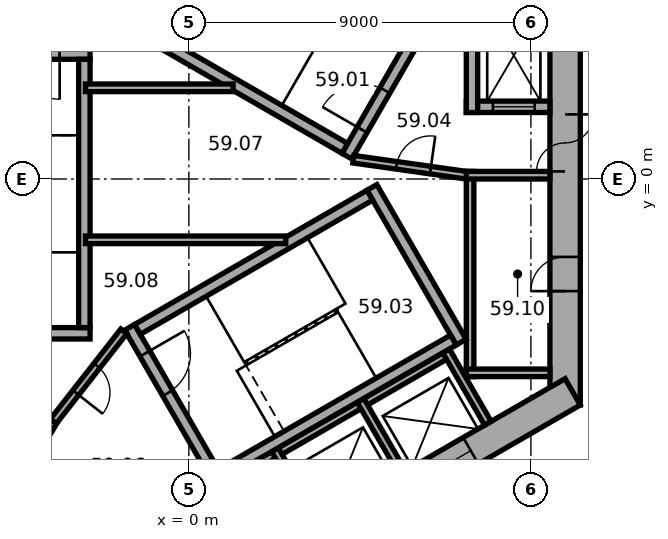
"""IFC4 building model, lengths in metres.
Left out: names, types, materials, properties, quantities, classifications, styles, units other than length and angle.
Written with IfcOpenShell. Run it as: python <this file> out.ifc"""

import sys

from ifc_helpers import new_model, si_unit, direction, frame, frame_2d, origin, place, context, subcontext, project, spatial, rectangle, extrude, element, fill, save


model = new_model("IFC4")
c1 = context("Model", 3, precision=1e-05, world=origin(), true_north=direction((0.0, 1.0)))
c2 = subcontext(c1, "Body", "Model", "MODEL_VIEW")
j1 = project(units=[si_unit("LENGTHUNIT", "METRE"), si_unit("PLANEANGLEUNIT", "RADIAN")], contexts=[c1])
p1 = place(None, origin())
s1 = spatial("IfcSite", under=j1, at=p1, CompositionType="ELEMENT")
p2 = place(p1, origin())
s2 = spatial("IfcBuilding", under=s1, at=p2, CompositionType="ELEMENT")
p3 = place(p2, frame((0.0, 0.0, 240.2)))
s3 = spatial("IfcBuildingStorey", under=s2, at=p3, CompositionType="ELEMENT", Elevation=240.2)
p4 = place(p3, frame((9.9, -5.947, 0.0), z_axis=(0.0, 0.0, 1.0), x_axis=(0.0, 1.0, 0.0)))
e1 = element("IfcWall", 1, at=p4, inside=s3, PredefinedType="SHEAR", context=c2, shape_type="SweptSolid", body=[
    extrude(rectangle(XDim=11.894, YDim=0.8, at=frame_2d((5.947, 0.0))), origin(), (0.0, 0.0, 1.0), 3.7),
])
p5 = place(p4, frame((6.147, 0.0, 0.0)))
e2 = element("IfcOpeningElement", 2, at=p5, cuts=e1, PredefinedType="OPENING", context=c2, shape_type="SweptSolid", body=[
    extrude(rectangle(XDim=1.5, YDim=2.1, at=frame_2d((0.75, 1.05))), frame((0.0, 0.41, 0.0), z_axis=(0.0, -1.0, 0.0), x_axis=(1.0, 0.0, 0.0)), (0.0, 0.0, 1.0), 0.82),
])
p6 = place(p4, frame((2.997, 0.0, 0.0)))
e3 = element("IfcOpeningElement", 3, at=p6, cuts=e1, PredefinedType="OPENING", context=c2, shape_type="SweptSolid", body=[
    extrude(rectangle(XDim=0.9, YDim=2.1, at=frame_2d((0.45, 1.05))), frame((0.0, 0.41, 0.0), z_axis=(0.0, -1.0, 0.0), x_axis=(1.0, 0.0, 0.0)), (0.0, 0.0, 1.0), 0.82),
])
p7 = place(p3, frame((-10.1, -5.6, 0.0), z_axis=(0.0, 0.0, 1.0), x_axis=(0.866023897231, -0.500002609418, 0.0)))
e4 = element("IfcWall", 4, at=p7, inside=s3, PredefinedType="SHEAR", context=c2, shape_type="SweptSolid", body=[
    extrude(rectangle(XDim=11.894, YDim=0.8, at=frame_2d((5.947, 0.0))), origin(), (0.0, 0.0, 1.0), 3.7),
])
p8 = place(p7, frame((6.147, 0.0, 0.0)))
e5 = element("IfcOpeningElement", 5, at=p8, cuts=e4, PredefinedType="OPENING", context=c2, shape_type="SweptSolid", body=[
    extrude(rectangle(XDim=1.5, YDim=2.1, at=frame_2d((0.75, 1.05))), frame((0.0, 0.41, 0.0), z_axis=(0.0, -1.0, 0.0), x_axis=(1.0, 0.0, 0.0)), (0.0, 0.0, 1.0), 0.82),
])
p9 = place(p7, frame((1.597, 0.0, 0.0)))
e6 = element("IfcOpeningElement", 6, at=p9, cuts=e4, PredefinedType="OPENING", context=c2, shape_type="SweptSolid", body=[
    extrude(rectangle(XDim=1.1, YDim=2.1, at=frame_2d((0.55, 1.05))), frame((0.0, 0.41, 0.0), z_axis=(0.0, -1.0, 0.0), x_axis=(1.0, 0.0, 0.0)), (0.0, 0.0, 1.0), 0.82),
])
p10 = place(p7, frame((4.197, 0.0, 0.0)))
e7 = element("IfcOpeningElement", 7, at=p10, cuts=e4, PredefinedType="OPENING", context=c2, shape_type="SweptSolid", body=[
    extrude(rectangle(XDim=1.1, YDim=2.1, at=frame_2d((0.55, 1.05))), frame((0.0, 0.41, 0.0), z_axis=(0.0, -1.0, 0.0), x_axis=(1.0, 0.0, 0.0)), (0.0, 0.0, 1.0), 0.82),
])
p11 = place(p3, frame((-0.2, -11.547, 0.0), z_axis=(0.0, 0.0, 1.0), x_axis=(0.866023897231, 0.500002609418, 0.0)))
e8 = element("IfcWall", 8, at=p11, inside=s3, PredefinedType="SHEAR", context=c2, shape_type="SweptSolid", body=[
    extrude(rectangle(XDim=11.894, YDim=0.8, at=frame_2d((5.947, 0.0))), origin(), (0.0, 0.0, 1.0), 3.7),
])
p12 = place(p11, frame((2.497, 0.0, 0.0)))
e9 = element("IfcOpeningElement", 9, at=p12, cuts=e8, PredefinedType="OPENING", context=c2, shape_type="SweptSolid", body=[
    extrude(rectangle(XDim=1.1, YDim=2.1, at=frame_2d((0.55, 1.05))), frame((0.0, 0.41, 0.0), z_axis=(0.0, -1.0, 0.0), x_axis=(1.0, 0.0, 0.0)), (0.0, 0.0, 1.0), 0.82),
])
p13 = place(p11, frame((5.097, 0.0, 0.0)))
e10 = element("IfcOpeningElement", 10, at=p13, cuts=e8, PredefinedType="OPENING", context=c2, shape_type="SweptSolid", body=[
    extrude(rectangle(XDim=1.1, YDim=2.1, at=frame_2d((0.55, 1.05))), frame((0.0, 0.41, 0.0), z_axis=(0.0, -1.0, 0.0), x_axis=(1.0, 0.0, 0.0)), (0.0, 0.0, 1.0), 0.82),
])
p14 = place(p11, frame((7.697, 0.0, 0.0)))
e11 = element("IfcOpeningElement", 11, at=p14, cuts=e8, PredefinedType="OPENING", context=c2, shape_type="SweptSolid", body=[
    extrude(rectangle(XDim=1.1, YDim=2.1, at=frame_2d((0.55, 1.05))), frame((0.0, 0.41, 0.0), z_axis=(0.0, -1.0, 0.0), x_axis=(1.0, 0.0, 0.0)), (0.0, 0.0, 1.0), 0.82),
])
p15 = place(p3, frame((7.4, -5.2, 0.0), z_axis=(0.0, 0.0, 1.0), x_axis=(0.0, 1.0, 0.0)))
e12 = element("IfcWall", 12, at=p15, inside=s3, PredefinedType="PARTITIONING", context=c2, shape_type="SweptSolid", body=[
    extrude(rectangle(XDim=5.4, YDim=0.2, at=frame_2d((2.7, 0.0))), origin(), (0.0, 0.0, 1.0), 3.42),
])
for number, where, z_axis, x_axis in (
    (13, (7.3, -5.1, 0.0), (0.0, 0.0, 1.0), (1.0, 0.0, 0.0)),
    (14, (7.3, 0.1, 0.0), (0.0, 0.0, 1.0), (1.0, 0.0, 0.0)),
):
    element("IfcWall", number, at=place(p3, frame(where, z_axis=z_axis, x_axis=x_axis)), inside=s3, PredefinedType="PARTITIONING", context=c2, shape_type="SweptSolid", body=[
        extrude(rectangle(XDim=2.2, YDim=0.2, at=frame_2d((1.1, 0.0))), origin(), (0.0, 0.0, 1.0), 3.42),
    ])
p16 = place(p3, frame((-8.203, -3.809, 0.0), z_axis=(0.0, 0.0, 1.0), x_axis=(0.866028230842, -0.499995103361, 0.0)))
e15 = element("IfcWall", 15, at=p16, inside=s3, PredefinedType="PARTITIONING", context=c2, shape_type="SweptSolid", body=[
    extrude(rectangle(XDim=5.4, YDim=0.2, at=frame_2d((2.7, 0.0))), origin(), (0.0, 0.0, 1.0), 3.42),
])
p17 = place(p3, frame((-3.563, -6.372, 0.0), z_axis=(0.0, 0.0, 1.0), x_axis=(-0.499994660107, -0.866028486751, 0.0)))
e16 = element("IfcWall", 16, at=p17, inside=s3, PredefinedType="PARTITIONING", context=c2, shape_type="SweptSolid", body=[
    extrude(rectangle(XDim=2.2, YDim=0.2, at=frame_2d((1.1, 0.0))), origin(), (0.0, 0.0, 1.0), 3.42),
])
p18 = place(p3, frame((-0.024, -8.559, 0.0), z_axis=(0.0, 0.0, 1.0), x_axis=(0.866026010844, 0.49999894854, 0.0)))
e17 = element("IfcWall", 17, at=p18, inside=s3, PredefinedType="PARTITIONING", context=c2, shape_type="SweptSolid", body=[
    extrude(rectangle(XDim=8.0, YDim=0.2, at=frame_2d((4.0, 0.0))), origin(), (0.0, 0.0, 1.0), 3.42),
])
for number, where, z_axis, x_axis in (
    (18, (2.264, -7.122, 0.0), (0.0, 0.0, 1.0), (0.5, -0.866, 0.0)),
    (19, (4.516, -5.822, 0.0), (0.0, 0.0, 1.0), (0.5, -0.866, 0.0)),
    (20, (6.768, -4.522, 0.0), (0.0, 0.0, 1.0), (0.5, -0.866, 0.0)),
):
    element("IfcWall", number, at=place(p3, frame(where, z_axis=z_axis, x_axis=x_axis)), inside=s3, PredefinedType="PARTITIONING", context=c2, shape_type="SweptSolid", body=[
        extrude(rectangle(XDim=2.2, YDim=0.2, at=frame_2d((1.1, 0.0))), origin(), (0.0, 0.0, 1.0), 3.42),
    ])
p19 = place(p3, frame((4.158, 0.602, 0.0), z_axis=(0.0, 0.0, 1.0), x_axis=(0.499977259774, 0.866038532462, 0.0)))
e21 = element("IfcWall", 21, at=p19, inside=s3, PredefinedType="SHEAR", context=c2, shape_type="SweptSolid", body=[
    extrude(rectangle(XDim=4.7, YDim=0.3, at=frame_2d((2.35, 0.0))), origin(), (0.0, 0.0, 1.0), 3.42),
])
p20 = place(p19, frame((0.8, 0.0, 0.0)))
e22 = element("IfcOpeningElement", 22, at=p20, cuts=e21, PredefinedType="OPENING", context=c2, shape_type="SweptSolid", body=[
    extrude(rectangle(XDim=1.2, YDim=2.1, at=frame_2d((0.6, 1.05))), frame((0.0, 0.16, 0.0), z_axis=(0.0, -1.0, 0.0), x_axis=(1.0, 0.0, 0.0)), (0.0, 0.0, 1.0), 0.32),
])
p21 = place(p3, frame((4.103, 0.807, 0.0), z_axis=(0.0, 0.0, 1.0), x_axis=(-0.866027801685, 0.499995846692, 0.0)))
e23 = element("IfcWall", 23, at=p21, inside=s3, PredefinedType="SHEAR", context=c2, shape_type="SweptSolid", body=[
    extrude(rectangle(XDim=7.06, YDim=0.3, at=frame_2d((3.53, 0.0))), origin(), (0.0, 0.0, 1.0), 3.42),
])
p22 = place(p3, frame((-2.6, 3.3, 0.0), z_axis=(0.0, 0.0, 1.0), x_axis=(-1.0, 0.0, 0.0)))
e24 = element("IfcWall", 24, at=p22, inside=s3, PredefinedType="SHEAR", context=c2, shape_type="SweptSolid", body=[
    extrude(rectangle(XDim=4.7, YDim=0.3, at=frame_2d((2.35, 0.0))), origin(), (0.0, 0.0, 1.0), 3.42),
])
p23 = place(p22, frame((0.8, 0.0, 0.0)))
e25 = element("IfcOpeningElement", 25, at=p23, cuts=e24, PredefinedType="OPENING", context=c2, shape_type="SweptSolid", body=[
    extrude(rectangle(XDim=1.2, YDim=2.1, at=frame_2d((0.6, 1.05))), frame((0.0, 0.16, 0.0), z_axis=(0.0, -1.0, 0.0), x_axis=(1.0, 0.0, 0.0)), (0.0, 0.0, 1.0), 0.32),
])
p24 = place(p3, frame((-2.6, -4.06, 0.0), z_axis=(0.0, 0.0, 1.0), x_axis=(-1.0, 0.0, 0.0)))
e26 = element("IfcWall", 26, at=p24, inside=s3, PredefinedType="SHEAR", context=c2, shape_type="SweptSolid", body=[
    extrude(rectangle(XDim=4.7, YDim=0.3, at=frame_2d((2.35, 0.0))), origin(), (0.0, 0.0, 1.0), 3.42),
])
p25 = place(p3, frame((-2.75, 3.15, 0.0), z_axis=(0.0, 0.0, 1.0), x_axis=(0.0, -1.0, 0.0)))
e27 = element("IfcWall", 27, at=p25, inside=s3, PredefinedType="SHEAR", context=c2, shape_type="SweptSolid", body=[
    extrude(rectangle(XDim=7.06, YDim=0.3, at=frame_2d((3.53, 0.0))), origin(), (0.0, 0.0, 1.0), 3.42),
])
p26 = place(p3, frame((-1.558, -3.902, 0.0), z_axis=(0.0, 0.0, 1.0), x_axis=(0.499977259774, -0.866038532462, 0.0)))
e28 = element("IfcWall", 28, at=p26, inside=s3, PredefinedType="SHEAR", context=c2, shape_type="SweptSolid", body=[
    extrude(rectangle(XDim=4.7, YDim=0.3, at=frame_2d((2.35, 0.0))), origin(), (0.0, 0.0, 1.0), 3.42),
])
p27 = place(p26, frame((0.8, 0.0, 0.0)))
e29 = element("IfcOpeningElement", 29, at=p27, cuts=e28, PredefinedType="OPENING", context=c2, shape_type="SweptSolid", body=[
    extrude(rectangle(XDim=1.2, YDim=2.1, at=frame_2d((0.6, 1.05))), frame((0.0, 0.16, 0.0), z_axis=(0.0, -1.0, 0.0), x_axis=(1.0, 0.0, 0.0)), (0.0, 0.0, 1.0), 0.32),
])
p28 = place(p3, frame((4.816, -0.222, 0.0), z_axis=(0.0, 0.0, 1.0), x_axis=(0.499977259774, -0.866038532462, 0.0)))
e30 = element("IfcWall", 30, at=p28, inside=s3, PredefinedType="SHEAR", context=c2, shape_type="SweptSolid", body=[
    extrude(rectangle(XDim=4.7, YDim=0.3, at=frame_2d((2.35, 0.0))), origin(), (0.0, 0.0, 1.0), 3.42),
])
for number, where, z_axis, x_axis in (
    (31, (-1.353, -3.957, 0.0), (0.0, 0.0, 1.0), (0.866, 0.5, 0.0)),
    (32, (0.847, -7.767, 0.0), (0.0, 0.0, 1.0), (0.866, 0.5, 0.0)),
):
    element("IfcWall", number, at=place(p3, frame(where, z_axis=z_axis, x_axis=x_axis)), inside=s3, PredefinedType="SHEAR", context=c2, shape_type="SweptSolid", body=[
        extrude(rectangle(XDim=7.06, YDim=0.3, at=frame_2d((3.53, 0.0))), origin(), (0.0, 0.0, 1.0), 3.42),
    ])
p29 = place(p3, frame((7.3, 1.9, 0.0), z_axis=(0.0, 0.0, 1.0), x_axis=(1.0, 0.0, 0.0)))
e33 = element("IfcWall", 33, at=p29, inside=s3, PredefinedType="SHEAR", context=c2, shape_type="SweptSolid", body=[
    extrude(rectangle(XDim=2.2, YDim=0.3, at=frame_2d((1.1, 0.0))), origin(), (0.0, 0.0, 1.0), 3.42),
])
p30 = place(p29, frame((0.7, 0.0, 0.0)))
e34 = element("IfcOpeningElement", 34, at=p30, cuts=e33, PredefinedType="OPENING", context=c2, shape_type="SweptSolid", body=[
    extrude(rectangle(XDim=1.1, YDim=2.1, at=frame_2d((0.55, 1.05))), frame((0.0, 0.16, 0.0), z_axis=(0.0, -1.0, 0.0), x_axis=(1.0, 0.0, 0.0)), (0.0, 0.0, 1.0), 0.32),
])
p31 = place(p3, frame((7.45, 1.75, 0.0), z_axis=(0.0, 0.0, 1.0), x_axis=(0.0, 1.0, 0.0)))
e35 = element("IfcWall", 35, at=p31, inside=s3, PredefinedType="SHEAR", context=c2, shape_type="SweptSolid", body=[
    extrude(rectangle(XDim=3.35, YDim=0.3, at=frame_2d((1.675, 0.0))), origin(), (0.0, 0.0, 1.0), 3.42),
])
p32 = place(p3, frame((4.327, 0.521, 0.0), z_axis=(0.0, 0.0, 1.0), x_axis=(0.990124376366, -0.14019172346, 0.0)))
e36 = element("IfcWall", 36, at=p32, inside=s3, PredefinedType="PARTITIONING", context=c2, shape_type="SweptSolid", body=[
    extrude(rectangle(XDim=3.002, YDim=0.2, at=frame_2d((1.501, 0.0))), origin(), (0.0, 0.0, 1.0), 3.42),
])
p33 = place(p32, frame((1.15, 0.0, 0.0)))
e37 = element("IfcOpeningElement", 37, at=p33, cuts=e36, PredefinedType="OPENING", context=c2, shape_type="SweptSolid", body=[
    extrude(rectangle(XDim=0.9, YDim=2.1, at=frame_2d((0.45, 1.05))), frame((0.0, 0.11, 0.0), z_axis=(0.0, -1.0, 0.0), x_axis=(1.0, 0.0, 0.0)), (0.0, 0.0, 1.0), 0.22),
])
p34 = place(p3, frame((-1.712, -4.008, 0.0), z_axis=(0.0, 0.0, 1.0), x_axis=(-0.616549420702, -0.787316208287, 0.0)))
e38 = element("IfcWall", 38, at=p34, inside=s3, PredefinedType="PARTITIONING", context=c2, shape_type="SweptSolid", body=[
    extrude(rectangle(XDim=3.002, YDim=0.2, at=frame_2d((1.501, 0.0))), origin(), (0.0, 0.0, 1.0), 3.42),
])
p35 = place(p34, frame((1.15, 0.0, 0.0)))
e39 = element("IfcOpeningElement", 39, at=p35, cuts=e38, PredefinedType="OPENING", context=c2, shape_type="SweptSolid", body=[
    extrude(rectangle(XDim=0.9, YDim=2.1, at=frame_2d((0.45, 1.05))), frame((0.0, 0.11, 0.0), z_axis=(0.0, -1.0, 0.0), x_axis=(1.0, 0.0, 0.0)), (0.0, 0.0, 1.0), 0.22),
])
p36 = place(p3, frame((-2.72, -1.6, 0.0), z_axis=(0.0, 0.0, 1.0), x_axis=(1.0, 0.0, 0.0)))
e40 = element("IfcWall", 40, at=p36, inside=s3, PredefinedType="PARTITIONING", context=c2, shape_type="SweptSolid", body=[
    extrude(rectangle(XDim=5.269, YDim=0.2, at=frame_2d((2.634, 0.0))), origin(), (0.0, 0.0, 1.0), 3.42),
])
p37 = place(p3, frame((-2.72, 2.4, 0.0), z_axis=(0.0, 0.0, 1.0), x_axis=(1.0, 0.0, 0.0)))
e41 = element("IfcWall", 41, at=p37, inside=s3, PredefinedType="PARTITIONING", context=c2, shape_type="SweptSolid", body=[
    extrude(rectangle(XDim=3.883, YDim=0.2, at=frame_2d((1.941, 0.0))), origin(), (0.0, 0.0, 1.0), 3.42),
])
p38 = place(p5, origin())
e42 = element("IfcDoor", 42, at=p38, inside=s3, OperationType="DOUBLE_DOOR_SINGLE_SWING", PredefinedType="DOOR", context=c2, shape_type="SweptSolid", body=[
    extrude(rectangle(XDim=1.5, YDim=2.1, at=frame_2d((0.75, 1.05))), frame((0.0, 0.025, 0.0), z_axis=(0.0, -1.0, 0.0), x_axis=(1.0, 0.0, 0.0)), (0.0, 0.0, 1.0), 0.05),
])
fill(e2, e42)
p39 = place(p20, origin())
e43 = element("IfcDoor", 43, at=p39, inside=s3, OperationType="SINGLE_SWING_RIGHT", PredefinedType="DOOR", context=c2, shape_type="SweptSolid", body=[
    extrude(rectangle(XDim=1.2, YDim=2.1, at=frame_2d((0.6, 1.05))), frame((0.0, 0.025, 0.0), z_axis=(0.0, -1.0, 0.0), x_axis=(1.0, 0.0, 0.0)), (0.0, 0.0, 1.0), 0.05),
])
fill(e22, e43)
p40 = place(p23, origin())
e44 = element("IfcDoor", 44, at=p40, inside=s3, OperationType="SINGLE_SWING_RIGHT", PredefinedType="DOOR", context=c2, shape_type="SweptSolid", body=[
    extrude(rectangle(XDim=1.2, YDim=2.1, at=frame_2d((0.6, 1.05))), frame((0.0, 0.025, 0.0), z_axis=(0.0, -1.0, 0.0), x_axis=(1.0, 0.0, 0.0)), (0.0, 0.0, 1.0), 0.05),
])
fill(e25, e44)
p41 = place(p27, origin())
e45 = element("IfcDoor", 45, at=p41, inside=s3, OperationType="SINGLE_SWING_RIGHT", PredefinedType="DOOR", context=c2, shape_type="SweptSolid", body=[
    extrude(rectangle(XDim=1.2, YDim=2.1, at=frame_2d((0.6, 1.05))), frame((0.0, 0.025, 0.0), z_axis=(0.0, -1.0, 0.0), x_axis=(1.0, 0.0, 0.0)), (0.0, 0.0, 1.0), 0.05),
])
fill(e29, e45)
p42 = place(p33, origin())
e46 = element("IfcDoor", 46, at=p42, inside=s3, OperationType="SINGLE_SWING_LEFT", PredefinedType="DOOR", context=c2, shape_type="SweptSolid", body=[
    extrude(rectangle(XDim=0.9, YDim=2.1, at=frame_2d((0.45, 1.05))), frame((0.0, 0.025, 0.0), z_axis=(0.0, -1.0, 0.0), x_axis=(1.0, 0.0, 0.0)), (0.0, 0.0, 1.0), 0.05),
])
fill(e37, e46)
p43 = place(p35, origin())
e47 = element("IfcDoor", 47, at=p43, inside=s3, OperationType="SINGLE_SWING_LEFT", PredefinedType="DOOR", context=c2, shape_type="SweptSolid", body=[
    extrude(rectangle(XDim=0.9, YDim=2.1, at=frame_2d((0.45, 1.05))), frame((0.0, 0.025, 0.0), z_axis=(0.0, -1.0, 0.0), x_axis=(1.0, 0.0, 0.0)), (0.0, 0.0, 1.0), 0.05),
])
fill(e39, e47)
p44 = place(p6, origin())
e48 = element("IfcDoor", 48, at=p44, inside=s3, OperationType="SINGLE_SWING_LEFT", PredefinedType="DOOR", context=c2, shape_type="SweptSolid", body=[
    extrude(rectangle(XDim=0.9, YDim=2.1, at=frame_2d((0.45, 1.05))), frame((0.0, 0.025, 0.0), z_axis=(0.0, -1.0, 0.0), x_axis=(1.0, 0.0, 0.0)), (0.0, 0.0, 1.0), 0.05),
])
fill(e3, e48)
p45 = place(p30, origin())
e49 = element("IfcDoor", 49, at=p45, inside=s3, OperationType="DOUBLE_DOOR_SLIDING", PredefinedType="DOOR", context=c2, shape_type="SweptSolid", body=[
    extrude(rectangle(XDim=1.1, YDim=2.1, at=frame_2d((0.55, 1.05))), frame((0.0, 0.025, 0.0), z_axis=(0.0, -1.0, 0.0), x_axis=(1.0, 0.0, 0.0)), (0.0, 0.0, 1.0), 0.05),
])
fill(e34, e49)
p46 = place(p14, origin())
e50 = element("IfcDoor", 50, at=p46, inside=s3, OperationType="DOUBLE_DOOR_SLIDING", PredefinedType="DOOR", context=c2, shape_type="SweptSolid", body=[
    extrude(rectangle(XDim=1.1, YDim=2.1, at=frame_2d((0.55, 1.05))), frame((0.0, 0.025, 0.0), z_axis=(0.0, -1.0, 0.0), x_axis=(1.0, 0.0, 0.0)), (0.0, 0.0, 1.0), 0.05),
])
fill(e11, e50)
save(model, sys.argv[1])
